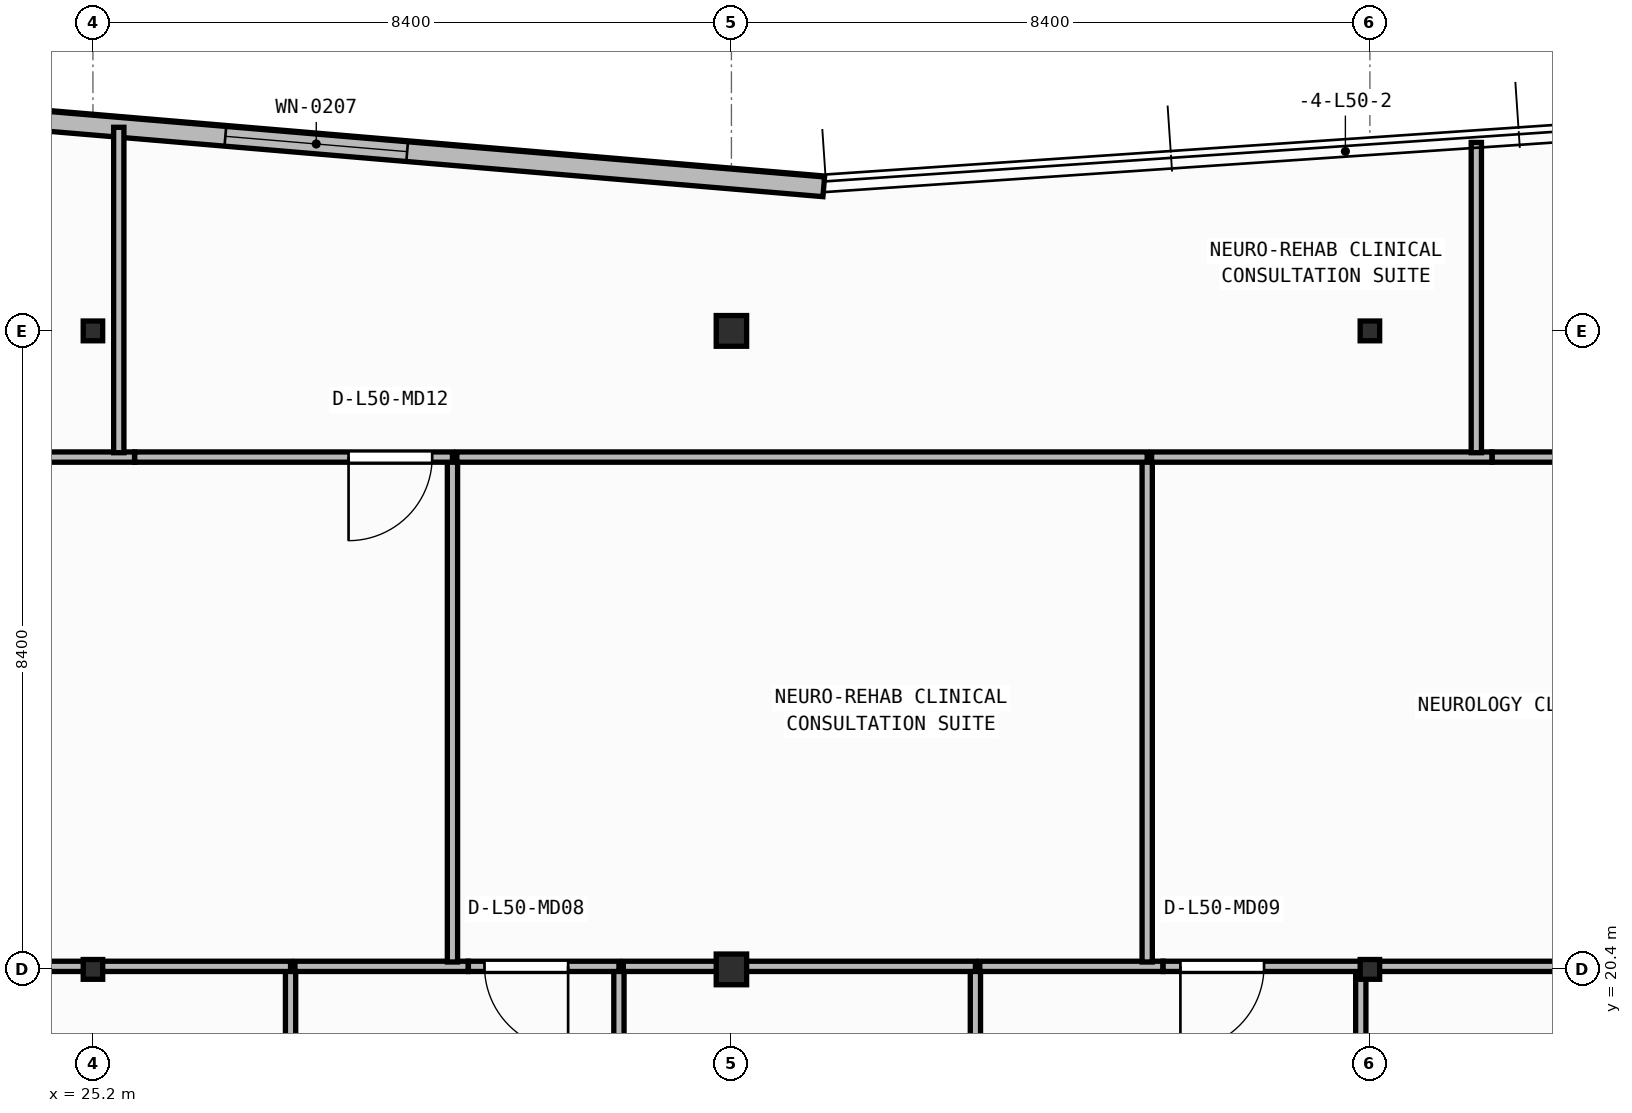
"""IFC4 building model, lengths in metres.
Left out: names, types, materials, properties, quantities, classifications, styles, units other than length and angle.
Written with IfcOpenShell. Run it as: python <this file> out.ifc"""

import sys

from ifc_helpers import new_model, si_unit, direction, frame, frame_2d, origin, origin_2d, place, context, subcontext, project, spatial, rectangle, i_section, extrude, element, fill, save


model = new_model("IFC4")
c1 = context("Model", 3, precision=1e-05, world=origin(), true_north=direction((0.0, 1.0)))
c2 = subcontext(c1, "Body", "Model", "MODEL_VIEW")
j1 = project(units=[si_unit("LENGTHUNIT", "METRE"), si_unit("PLANEANGLEUNIT", "RADIAN")], contexts=[c1])
p1 = place(None, origin())
s1 = spatial("IfcSite", under=j1, at=p1, CompositionType="ELEMENT")
p2 = place(p1, origin())
s2 = spatial("IfcBuilding", under=s1, at=p2, CompositionType="ELEMENT")
p3 = place(p2, frame((0.0, 0.0, 203.95)))
s3 = spatial("IfcBuildingStorey", under=s2, at=p3, CompositionType="ELEMENT", Elevation=203.95)
p4 = place(p3, frame((25.2, 20.4, 0.0), z_axis=(0.0, 0.0, 1.0), x_axis=(1.0, 0.0, 0.0)))
e1 = element("IfcColumn", 1, at=p4, inside=s3, PredefinedType="COLUMN", context=c2, shape_type="SweptSolid", body=[
    extrude(i_section(OverallWidth=0.256, OverallDepth=0.26, WebThickness=0.01, FlangeThickness=0.017, FilletRadius=0.013, at=origin_2d()), origin(), (0.0, 0.0, 1.0), 3.95),
])
p5 = place(p3, frame((33.6, 20.4, 0.0), z_axis=(0.0, 0.0, 1.0), x_axis=(1.0, 0.0, 0.0)))
e2 = element("IfcColumn", 2, at=p5, inside=s3, PredefinedType="COLUMN", context=c2, shape_type="SweptSolid", body=[
    extrude(i_section(OverallWidth=0.4, OverallDepth=0.404, WebThickness=0.02, FlangeThickness=0.032, at=origin_2d()), origin(), (0.0, 0.0, 1.0), 3.95),
])
for number, where, z_axis, x_axis in (
    (3, (42.0, 20.4, 0.0), (0.0, 0.0, 1.0), (1.0, 0.0, 0.0)),
    (4, (25.2, 28.8, 0.0), (0.0, 0.0, 1.0), (1.0, 0.0, 0.0)),
):
    element("IfcColumn", number, at=place(p3, frame(where, z_axis=z_axis, x_axis=x_axis)), inside=s3, PredefinedType="COLUMN", context=c2, shape_type="SweptSolid", body=[
        extrude(i_section(OverallWidth=0.256, OverallDepth=0.26, WebThickness=0.01, FlangeThickness=0.017, FilletRadius=0.013, at=origin_2d()), origin(), (0.0, 0.0, 1.0), 3.95),
    ])
p6 = place(p3, frame((33.6, 28.8, 0.0), z_axis=(0.0, 0.0, 1.0), x_axis=(1.0, 0.0, 0.0)))
e5 = element("IfcColumn", 5, at=p6, inside=s3, PredefinedType="COLUMN", context=c2, shape_type="SweptSolid", body=[
    extrude(i_section(OverallWidth=0.4, OverallDepth=0.404, WebThickness=0.02, FlangeThickness=0.032, at=origin_2d()), origin(), (0.0, 0.0, 1.0), 3.95),
])
p7 = place(p3, frame((42.0, 28.8, 0.0), z_axis=(0.0, 0.0, 1.0), x_axis=(1.0, 0.0, 0.0)))
e6 = element("IfcColumn", 6, at=p7, inside=s3, PredefinedType="COLUMN", context=c2, shape_type="SweptSolid", body=[
    extrude(i_section(OverallWidth=0.256, OverallDepth=0.26, WebThickness=0.01, FlangeThickness=0.017, FilletRadius=0.013, at=origin_2d()), origin(), (0.0, 0.0, 1.0), 3.95),
])
p8 = place(p3, frame((34.815, 30.696, 0.0), z_axis=(0.0, 0.0, 1.0), x_axis=(-0.996454704935, 0.084130975344, 0.0)))
e7 = element("IfcWall", 7, at=p8, inside=s3, PredefinedType="STANDARD", context=c2, shape_type="SweptSolid", body=[
    extrude(rectangle(XDim=13.401, YDim=0.26, at=frame_2d((6.701, 0.0))), origin(), (0.0, 0.0, 1.0), 3.71),
])
p9 = place(p8, frame((5.5, 0.0, 0.9)))
e8 = element("IfcOpeningElement", 8, at=p9, cuts=e7, PredefinedType="OPENING", context=c2, shape_type="SweptSolid", body=[
    extrude(rectangle(XDim=2.4, YDim=1.65, at=frame_2d((1.2, 0.825))), frame((0.0, 0.14, 0.0), z_axis=(0.0, -1.0, 0.0), x_axis=(1.0, 0.0, 0.0)), (0.0, 0.0, 1.0), 0.28),
])
p10 = place(p3, frame((27.8, 17.833, 0.0), z_axis=(0.0, 0.0, 1.0), x_axis=(0.0, 1.0, 0.0)))
e9 = element("IfcWall", 9, at=p10, inside=s3, PredefinedType="PARTITIONING", context=c2, shape_type="SweptSolid", body=[
    extrude(rectangle(XDim=2.607, YDim=0.135, at=frame_2d((1.304, 0.0))), origin(), (0.0, 0.0, 1.0), 3.71),
])
p11 = place(p3, frame((27.8, 20.44, 0.0), z_axis=(0.0, 0.0, 1.0), x_axis=(-1.0, 0.0, 0.0)))
e10 = element("IfcWall", 10, at=p11, inside=s3, PredefinedType="PARTITIONING", context=c2, shape_type="SweptSolid", body=[
    extrude(rectangle(XDim=5.012, YDim=0.135, at=frame_2d((2.506, 0.0))), origin(), (0.0, 0.0, 1.0), 3.152),
])
p12 = place(p3, frame((32.12, 14.76, 0.0), z_axis=(0.0, 0.0, 1.0), x_axis=(0.0, 1.0, 0.0)))
e11 = element("IfcWall", 11, at=p12, inside=s3, PredefinedType="PARTITIONING", context=c2, shape_type="SweptSolid", body=[
    extrude(rectangle(XDim=5.68, YDim=0.135, at=frame_2d((2.84, 0.0))), origin(), (0.0, 0.0, 1.0), 3.71),
])
p13 = place(p3, frame((30.137, 20.44, 0.0), z_axis=(0.0, 0.0, 1.0), x_axis=(-1.0, 0.0, 0.0)))
e12 = element("IfcWall", 12, at=p13, inside=s3, PredefinedType="PARTITIONING", context=c2, shape_type="SweptSolid", body=[
    extrude(rectangle(XDim=2.28, YDim=0.135, at=frame_2d((1.14, 0.0))), origin(), (0.0, 0.0, 1.0), 3.152),
])
p14 = place(p3, frame((32.12, 20.44, 0.0), z_axis=(0.0, 0.0, 1.0), x_axis=(-1.0, 0.0, 0.0)))
e13 = element("IfcWall", 13, at=p14, inside=s3, PredefinedType="PARTITIONING", context=c2, shape_type="SweptSolid", body=[
    extrude(rectangle(XDim=1.981, YDim=0.135, at=frame_2d((0.99, 0.0))), origin(), (0.0, 0.0, 1.0), 3.152),
])
p15 = place(p14, frame((0.668, 0.0, 0.0)))
e14 = element("IfcOpeningElement", 14, at=p15, cuts=e13, PredefinedType="OPENING", context=c2, shape_type="SweptSolid", body=[
    extrude(rectangle(XDim=1.1, YDim=2.1, at=frame_2d((0.55, 1.05))), frame((0.0, 0.077, 0.0), z_axis=(0.0, -1.0, 0.0), x_axis=(1.0, 0.0, 0.0)), (0.0, 0.0, 1.0), 0.155),
])
p16 = place(p3, frame((36.81, 17.833, 0.0), z_axis=(0.0, 0.0, 1.0), x_axis=(0.0, 1.0, 0.0)))
e15 = element("IfcWall", 15, at=p16, inside=s3, PredefinedType="PARTITIONING", context=c2, shape_type="SweptSolid", body=[
    extrude(rectangle(XDim=2.607, YDim=0.135, at=frame_2d((1.304, 0.0))), origin(), (0.0, 0.0, 1.0), 3.71),
])
p17 = place(p3, frame((36.81, 20.44, 0.0), z_axis=(0.0, 0.0, 1.0), x_axis=(-1.0, 0.0, 0.0)))
e16 = element("IfcWall", 16, at=p17, inside=s3, PredefinedType="PARTITIONING", context=c2, shape_type="SweptSolid", body=[
    extrude(rectangle(XDim=4.633, YDim=0.135, at=frame_2d((2.316, 0.0))), origin(), (0.0, 0.0, 1.0), 3.152),
])
p18 = place(p3, frame((41.88, 14.76, 0.0), z_axis=(0.0, 0.0, 1.0), x_axis=(0.0, 1.0, 0.0)))
e17 = element("IfcWall", 17, at=p18, inside=s3, PredefinedType="PARTITIONING", context=c2, shape_type="SweptSolid", body=[
    extrude(rectangle(XDim=5.68, YDim=0.135, at=frame_2d((2.84, 0.0))), origin(), (0.0, 0.0, 1.0), 3.157),
])
p19 = place(p3, frame((39.278, 20.44, 0.0), z_axis=(0.0, 0.0, 1.0), x_axis=(-1.0, 0.0, 0.0)))
e18 = element("IfcWall", 18, at=p19, inside=s3, PredefinedType="PARTITIONING", context=c2, shape_type="SweptSolid", body=[
    extrude(rectangle(XDim=2.41, YDim=0.135, at=frame_2d((1.205, 0.0))), origin(), (0.0, 0.0, 1.0), 3.152),
])
p20 = place(p3, frame((41.88, 20.44, 0.0), z_axis=(0.0, 0.0, 1.0), x_axis=(-1.0, 0.0, 0.0)))
e19 = element("IfcWall", 19, at=p20, inside=s3, PredefinedType="PARTITIONING", context=c2, shape_type="SweptSolid", body=[
    extrude(rectangle(XDim=2.6, YDim=0.135, at=frame_2d((1.3, 0.0))), origin(), (0.0, 0.0, 1.0), 3.152),
])
p21 = place(p20, frame((1.273, 0.0, 0.0)))
e20 = element("IfcOpeningElement", 20, at=p21, cuts=e19, PredefinedType="OPENING", context=c2, shape_type="SweptSolid", body=[
    extrude(rectangle(XDim=1.1, YDim=2.1, at=frame_2d((0.55, 1.05))), frame((0.0, 0.077, 0.0), z_axis=(0.0, -1.0, 0.0), x_axis=(1.0, 0.0, 0.0)), (0.0, 0.0, 1.0), 0.155),
])
p22 = place(p3, frame((46.2, 20.44, 0.0), z_axis=(0.0, 0.0, 1.0), x_axis=(-1.0, 0.0, 0.0)))
e21 = element("IfcWall", 21, at=p22, inside=s3, PredefinedType="PARTITIONING", context=c2, shape_type="SweptSolid", body=[
    extrude(rectangle(XDim=4.262, YDim=0.135, at=frame_2d((2.131, 0.0))), origin(), (0.0, 0.0, 1.0), 3.152),
])
p23 = place(p3, frame((29.93, 20.498, 0.0), z_axis=(0.0, 0.0, 1.0), x_axis=(0.0, 1.0, 0.0)))
e22 = element("IfcWall", 22, at=p23, inside=s3, PredefinedType="PARTITIONING", context=c2, shape_type="SweptSolid", body=[
    extrude(rectangle(XDim=6.642, YDim=0.135, at=frame_2d((3.321, 0.0))), origin(), (0.0, 0.0, 1.0), 3.71),
])
p24 = place(p3, frame((25.748, 27.14, 0.0), z_axis=(0.0, 0.0, 1.0), x_axis=(-1.0, 0.0, 0.0)))
e23 = element("IfcWall", 23, at=p24, inside=s3, PredefinedType="PARTITIONING", context=c2, shape_type="SweptSolid", body=[
    extrude(rectangle(XDim=11.968, YDim=0.135, at=frame_2d((5.984, 0.0))), origin(), (0.0, 0.0, 1.0), 3.71),
])
p25 = place(p3, frame((29.93, 27.14, 0.0), z_axis=(0.0, 0.0, 1.0), x_axis=(-1.0, 0.0, 0.0)))
e24 = element("IfcWall", 24, at=p25, inside=s3, PredefinedType="PARTITIONING", context=c2, shape_type="SweptSolid", body=[
    extrude(rectangle(XDim=4.18, YDim=0.135, at=frame_2d((2.09, 0.0))), origin(), (0.0, 0.0, 1.0), 3.71),
])
p26 = place(p25, frame((0.267, 0.0, 0.0)))
e25 = element("IfcOpeningElement", 25, at=p26, cuts=e24, PredefinedType="OPENING", context=c2, shape_type="SweptSolid", body=[
    extrude(rectangle(XDim=1.1, YDim=2.1, at=frame_2d((0.55, 1.05))), frame((0.0, 0.077, 0.0), z_axis=(0.0, -1.0, 0.0), x_axis=(1.0, 0.0, 0.0)), (0.0, 0.0, 1.0), 0.155),
])
p27 = place(p3, frame((39.07, 20.498, 0.0), z_axis=(0.0, 0.0, 1.0), x_axis=(0.0, 1.0, 0.0)))
e26 = element("IfcWall", 26, at=p27, inside=s3, PredefinedType="PARTITIONING", context=c2, shape_type="SweptSolid", body=[
    extrude(rectangle(XDim=6.642, YDim=0.135, at=frame_2d((3.321, 0.0))), origin(), (0.0, 0.0, 1.0), 3.71),
])
p28 = place(p3, frame((39.07, 27.14, 0.0), z_axis=(0.0, 0.0, 1.0), x_axis=(-1.0, 0.0, 0.0)))
e27 = element("IfcWall", 27, at=p28, inside=s3, PredefinedType="PARTITIONING", context=c2, shape_type="SweptSolid", body=[
    extrude(rectangle(XDim=9.083, YDim=0.135, at=frame_2d((4.541, 0.0))), origin(), (0.0, 0.0, 1.0), 3.71),
])
p29 = place(p3, frame((43.607, 27.14, 0.0), z_axis=(0.0, 0.0, 1.0), x_axis=(-1.0, 0.0, 0.0)))
e28 = element("IfcWall", 28, at=p29, inside=s3, PredefinedType="PARTITIONING", context=c2, shape_type="SweptSolid", body=[
    extrude(rectangle(XDim=4.48, YDim=0.135, at=frame_2d((2.24, 0.0))), origin(), (0.0, 0.0, 1.0), 3.71),
])
p30 = place(p3, frame((51.04, 27.14, 0.0), z_axis=(0.0, 0.0, 1.0), x_axis=(-1.0, 0.0, 0.0)))
e29 = element("IfcWall", 29, at=p30, inside=s3, PredefinedType="PARTITIONING", context=c2, shape_type="SweptSolid", body=[
    extrude(rectangle(XDim=7.43, YDim=0.135, at=frame_2d((3.715, 0.0))), origin(), (0.0, 0.0, 1.0), 3.71),
])
p31 = place(p30, frame((0.348, 0.0, 0.0)))
e30 = element("IfcOpeningElement", 30, at=p31, cuts=e29, PredefinedType="OPENING", context=c2, shape_type="SweptSolid", body=[
    extrude(rectangle(XDim=1.1, YDim=2.1, at=frame_2d((0.55, 1.05))), frame((0.0, 0.077, 0.0), z_axis=(0.0, -1.0, 0.0), x_axis=(1.0, 0.0, 0.0)), (0.0, 0.0, 1.0), 0.155),
])
p32 = place(p3, frame((25.54, 27.198, 0.0), z_axis=(0.0, 0.0, 1.0), x_axis=(0.0, 1.0, 0.0)))
e31 = element("IfcWall", 31, at=p32, inside=s3, PredefinedType="PARTITIONING", context=c2, shape_type="SweptSolid", body=[
    extrude(rectangle(XDim=4.281, YDim=0.135, at=frame_2d((2.141, 0.0))), origin(), (0.0, 0.0, 1.0), 3.157),
])
p33 = place(p3, frame((43.4, 27.198, 0.0), z_axis=(0.0, 0.0, 1.0), x_axis=(0.0, 1.0, 0.0)))
e32 = element("IfcWall", 32, at=p33, inside=s3, PredefinedType="PARTITIONING", context=c2, shape_type="SweptSolid", body=[
    extrude(rectangle(XDim=4.082, YDim=0.135, at=frame_2d((2.041, 0.0))), origin(), (0.0, 0.0, 1.0), 3.71),
])
p34 = place(p9, origin())
e33 = element("IfcWindow", 33, at=p34, inside=s3, PartitioningType="SINGLE_PANEL", PredefinedType="WINDOW", context=c2, shape_type="SweptSolid", body=[
    extrude(rectangle(XDim=2.4, YDim=1.65, at=frame_2d((1.2, 0.825))), frame((0.0, 0.03, 0.0), z_axis=(0.0, -1.0, 0.0), x_axis=(1.0, 0.0, 0.0)), (0.0, 0.0, 1.0), 0.06),
])
fill(e8, e33)
p35 = place(p15, origin())
e34 = element("IfcDoor", 34, at=p35, inside=s3, OperationType="SINGLE_SWING_LEFT", PredefinedType="DOOR", context=c2, shape_type="SweptSolid", body=[
    extrude(rectangle(XDim=1.1, YDim=2.1, at=frame_2d((0.55, 1.05))), frame((0.0, 0.025, 0.0), z_axis=(0.0, -1.0, 0.0), x_axis=(1.0, 0.0, 0.0)), (0.0, 0.0, 1.0), 0.05),
])
fill(e14, e34)
p36 = place(p21, origin())
e35 = element("IfcDoor", 35, at=p36, inside=s3, OperationType="SINGLE_SWING_RIGHT", PredefinedType="DOOR", context=c2, shape_type="SweptSolid", body=[
    extrude(rectangle(XDim=1.1, YDim=2.1, at=frame_2d((0.55, 1.05))), frame((0.0, 0.025, 0.0), z_axis=(0.0, -1.0, 0.0), x_axis=(1.0, 0.0, 0.0)), (0.0, 0.0, 1.0), 0.05),
])
fill(e20, e35)
p37 = place(p26, origin())
e36 = element("IfcDoor", 36, at=p37, inside=s3, OperationType="SINGLE_SWING_RIGHT", PredefinedType="DOOR", context=c2, shape_type="SweptSolid", body=[
    extrude(rectangle(XDim=1.1, YDim=2.1, at=frame_2d((0.55, 1.05))), frame((0.0, 0.025, 0.0), z_axis=(0.0, -1.0, 0.0), x_axis=(1.0, 0.0, 0.0)), (0.0, 0.0, 1.0), 0.05),
])
fill(e25, e36)
save(model, sys.argv[1])
